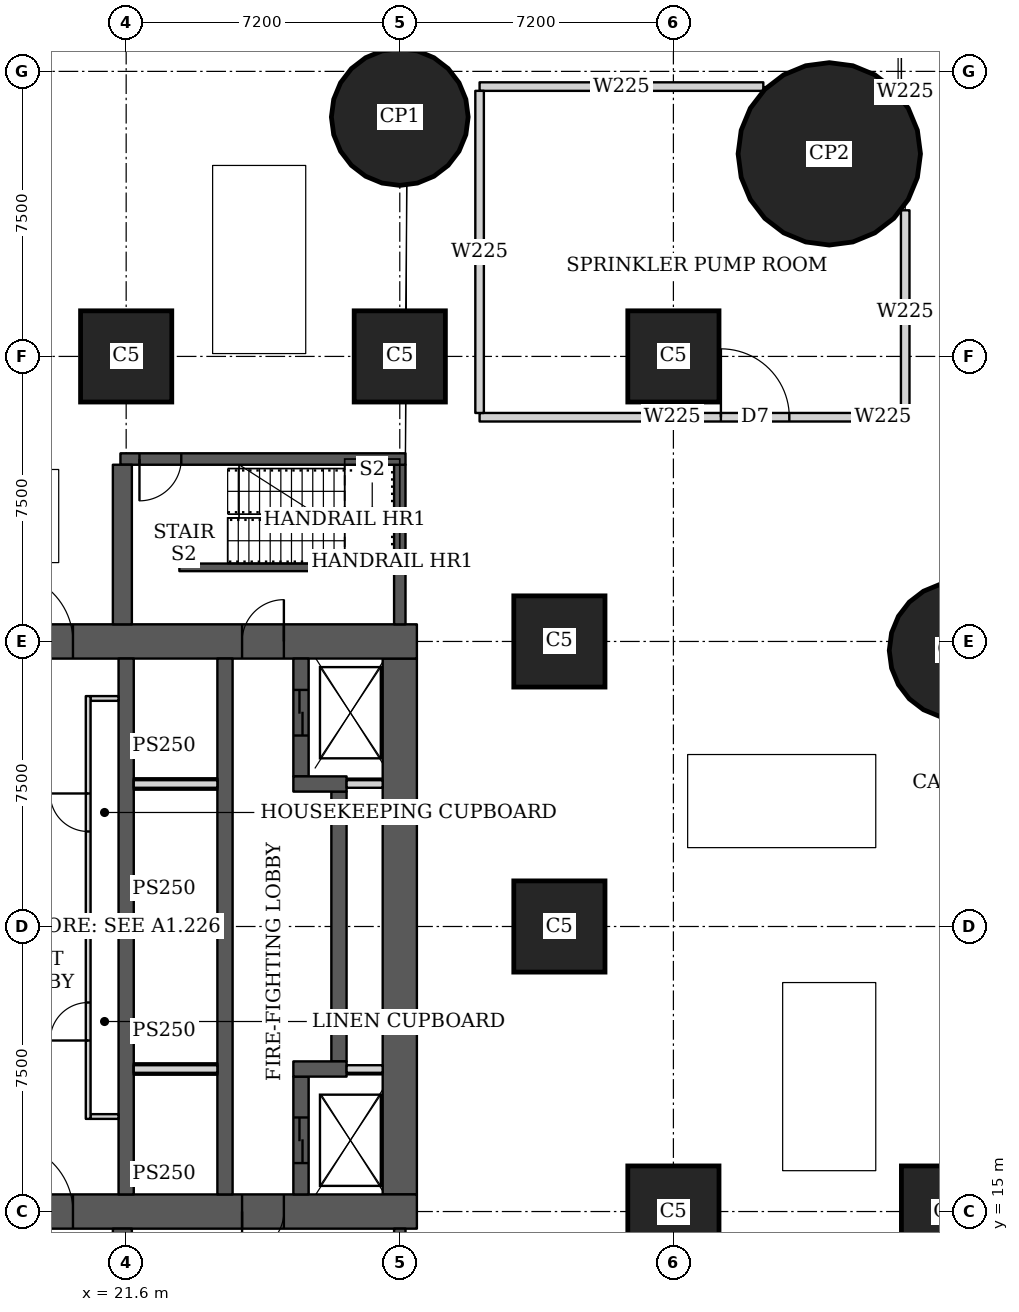
"""IFC4 building model, lengths in metres.
Left out: names, types, materials, properties, quantities, classifications, styles, units other than length and angle.
Written with IfcOpenShell. Run it as: python <this file> out.ifc"""

import sys

from ifc_helpers import new_model, si_unit, direction, frame, frame_2d, origin, origin_2d, place, context, subcontext, project, spatial, rectangle, circle, extrude, element, fill, save


model = new_model("IFC4")
c1 = context("Model", 3, precision=1e-05, world=origin(), true_north=direction((0.0, 1.0)))
c2 = subcontext(c1, "Body", "Model", "MODEL_VIEW")
j1 = project(units=[si_unit("LENGTHUNIT", "METRE"), si_unit("PLANEANGLEUNIT", "RADIAN")], contexts=[c1])
p1 = place(None, origin())
s1 = spatial("IfcSite", under=j1, at=p1, CompositionType="ELEMENT")
p2 = place(p1, origin())
s2 = spatial("IfcBuilding", under=s1, at=p2, CompositionType="ELEMENT")
p3 = place(p2, frame((0.0, 0.0, -4.0)))
s3 = spatial("IfcBuildingStorey", under=s2, at=p3, CompositionType="ELEMENT", Elevation=-4.0)
for number, where, z_axis, x_axis in (
    (1, (36.0, 15.0, 0.0), (0.0, 0.0, 1.0), (1.0, 0.0, 0.0)),
    (2, (43.2, 15.0, 0.0), (0.0, 0.0, 1.0), (1.0, 0.0, 0.0)),
    (3, (33.0, 22.5, 0.0), (0.0, 0.0, 1.0), (1.0, 0.0, 0.0)),
    (4, (33.0, 30.0, 0.0), (0.0, 0.0, 1.0), (1.0, 0.0, 0.0)),
):
    element("IfcColumn", number, at=place(p3, frame(where, z_axis=z_axis, x_axis=x_axis)), inside=s3, PredefinedType="COLUMN", context=c2, shape_type="SweptSolid", body=[
        extrude(rectangle(XDim=2.4, YDim=2.4, at=origin_2d()), origin(), (0.0, 0.0, 1.0), 4.0),
    ])
p4 = place(p3, frame((43.48, 29.763, 0.0), z_axis=(0.0, 0.0, 1.0), x_axis=(1.0, 0.0, 0.0)))
e5 = element("IfcColumn", 5, at=p4, inside=s3, PredefinedType="COLUMN", context=c2, shape_type="SweptSolid", body=[
    extrude(circle(Radius=1.8, at=origin_2d()), origin(), (0.0, 0.0, 1.0), 4.0),
])
for number, where, z_axis, x_axis in (
    (6, (21.6, 37.5, 0.0), (0.0, 0.0, 1.0), (1.0, 0.0, 0.0)),
    (7, (28.8, 37.5, 0.0), (0.0, 0.0, 1.0), (1.0, 0.0, 0.0)),
    (8, (36.0, 37.5, 0.0), (0.0, 0.0, 1.0), (1.0, 0.0, 0.0)),
):
    element("IfcColumn", number, at=place(p3, frame(where, z_axis=z_axis, x_axis=x_axis)), inside=s3, PredefinedType="COLUMN", context=c2, shape_type="SweptSolid", body=[
        extrude(rectangle(XDim=2.4, YDim=2.4, at=origin_2d()), origin(), (0.0, 0.0, 1.0), 4.0),
    ])
p5 = place(p3, frame((40.102, 42.83, 0.0), z_axis=(0.0, 0.0, 1.0), x_axis=(1.0, 0.0, 0.0)))
e9 = element("IfcColumn", 9, at=p5, inside=s3, PredefinedType="COLUMN", context=c2, shape_type="SweptSolid", body=[
    extrude(circle(Radius=2.4, at=origin_2d()), origin(), (0.0, 0.0, 1.0), 4.0),
])
p6 = place(p3, frame((28.8, 43.8, 0.0), z_axis=(0.0, 0.0, 1.0), x_axis=(1.0, 0.0, 0.0)))
e10 = element("IfcColumn", 10, at=p6, inside=s3, PredefinedType="COLUMN", context=c2, shape_type="SweptSolid", body=[
    extrude(circle(Radius=1.8, at=origin_2d()), origin(), (0.0, 0.0, 1.0), 4.0),
])
p7 = place(p3, frame((13.95, 15.0, 0.0), z_axis=(0.0, 0.0, 1.0), x_axis=(1.0, 0.0, 0.0)))
e11 = element("IfcWall", 11, at=p7, inside=s3, PredefinedType="SHEAR", context=c2, shape_type="SweptSolid", body=[
    extrude(rectangle(XDim=15.3, YDim=0.9, at=frame_2d((7.65, 0.0))), origin(), (0.0, 0.0, 1.0), 4.0),
])
p8 = place(p7, frame((4.45, 0.0, 0.0)))
e12 = element("IfcOpeningElement", 12, at=p8, cuts=e11, PredefinedType="OPENING", context=c2, shape_type="SweptSolid", body=[
    extrude(rectangle(XDim=1.8, YDim=2.1, at=frame_2d((0.9, 1.05))), frame((0.0, 0.46, 0.0), z_axis=(0.0, -1.0, 0.0), x_axis=(1.0, 0.0, 0.0)), (0.0, 0.0, 1.0), 0.92),
])
p9 = place(p7, frame((10.7, 0.0, 0.0)))
e13 = element("IfcOpeningElement", 13, at=p9, cuts=e11, PredefinedType="OPENING", context=c2, shape_type="SweptSolid", body=[
    extrude(rectangle(XDim=1.1, YDim=2.1, at=frame_2d((0.55, 1.05))), frame((0.0, 0.46, 0.0), z_axis=(0.0, -1.0, 0.0), x_axis=(1.0, 0.0, 0.0)), (0.0, 0.0, 1.0), 0.92),
])
p10 = place(p3, frame((13.95, 30.0, 0.0), z_axis=(0.0, 0.0, 1.0), x_axis=(1.0, 0.0, 0.0)))
e14 = element("IfcWall", 14, at=p10, inside=s3, PredefinedType="SHEAR", context=c2, shape_type="SweptSolid", body=[
    extrude(rectangle(XDim=15.3, YDim=0.9, at=frame_2d((7.65, 0.0))), origin(), (0.0, 0.0, 1.0), 4.0),
])
p11 = place(p10, frame((4.45, 0.0, 0.0)))
e15 = element("IfcOpeningElement", 15, at=p11, cuts=e14, PredefinedType="OPENING", context=c2, shape_type="SweptSolid", body=[
    extrude(rectangle(XDim=1.8, YDim=2.1, at=frame_2d((0.9, 1.05))), frame((0.0, 0.46, 0.0), z_axis=(0.0, -1.0, 0.0), x_axis=(1.0, 0.0, 0.0)), (0.0, 0.0, 1.0), 0.92),
])
p12 = place(p10, frame((10.7, 0.0, 0.0)))
e16 = element("IfcOpeningElement", 16, at=p12, cuts=e14, PredefinedType="OPENING", context=c2, shape_type="SweptSolid", body=[
    extrude(rectangle(XDim=1.1, YDim=2.1, at=frame_2d((0.55, 1.05))), frame((0.0, 0.46, 0.0), z_axis=(0.0, -1.0, 0.0), x_axis=(1.0, 0.0, 0.0)), (0.0, 0.0, 1.0), 0.92),
])
p13 = place(p3, frame((28.8, 15.45, 0.0), z_axis=(0.0, 0.0, 1.0), x_axis=(0.0, 1.0, 0.0)))
e17 = element("IfcWall", 17, at=p13, inside=s3, PredefinedType="SHEAR", context=c2, shape_type="SweptSolid", body=[
    extrude(rectangle(XDim=14.1, YDim=0.9, at=frame_2d((7.05, 0.0))), origin(), (0.0, 0.0, 1.0), 4.0),
])
for number, where, z_axis, x_axis in (
    (18, (21.6, 15.45, 0.0), (0.0, 0.0, 1.0), (0.0, 1.0, 0.0)),
    (19, (24.2, 15.45, 0.0), (0.0, 0.0, 1.0), (0.0, 1.0, 0.0)),
):
    element("IfcWall", number, at=place(p3, frame(where, z_axis=z_axis, x_axis=x_axis)), inside=s3, PredefinedType="SHEAR", context=c2, shape_type="SweptSolid", body=[
        extrude(rectangle(XDim=14.1, YDim=0.4, at=frame_2d((7.05, 0.0))), origin(), (0.0, 0.0, 1.0), 4.0),
    ])
p14 = place(p3, frame((26.2, 15.45, 0.0), z_axis=(0.0, 0.0, 1.0), x_axis=(0.0, 1.0, 0.0)))
e20 = element("IfcWall", 20, at=p14, inside=s3, PredefinedType="SHEAR", context=c2, shape_type="SweptSolid", body=[
    extrude(rectangle(XDim=3.1, YDim=0.4, at=frame_2d((1.55, 0.0))), origin(), (0.0, 0.0, 1.0), 4.0),
])
p15 = place(p14, frame((0.825, 0.0, 0.0)))
e21 = element("IfcOpeningElement", 21, at=p15, cuts=e20, PredefinedType="OPENING", context=c2, shape_type="SweptSolid", body=[
    extrude(rectangle(XDim=1.2, YDim=2.1, at=frame_2d((0.6, 1.05))), frame((0.0, 0.21, 0.0), z_axis=(0.0, -1.0, 0.0), x_axis=(1.0, 0.0, 0.0)), (0.0, 0.0, 1.0), 0.42),
])
p16 = place(p3, frame((26.0, 18.75, 0.0), z_axis=(0.0, 0.0, 1.0), x_axis=(1.0, 0.0, 0.0)))
e22 = element("IfcWall", 22, at=p16, inside=s3, PredefinedType="SHEAR", context=c2, shape_type="SweptSolid", body=[
    extrude(rectangle(XDim=1.4, YDim=0.4, at=frame_2d((0.7, 0.0))), origin(), (0.0, 0.0, 1.0), 4.0),
])
p17 = place(p3, frame((27.2, 18.95, 0.0), z_axis=(0.0, 0.0, 1.0), x_axis=(0.0, 1.0, 0.0)))
e23 = element("IfcWall", 23, at=p17, inside=s3, PredefinedType="SHEAR", context=c2, shape_type="SweptSolid", body=[
    extrude(rectangle(XDim=7.1, YDim=0.4, at=frame_2d((3.55, 0.0))), origin(), (0.0, 0.0, 1.0), 4.0),
])
p18 = place(p3, frame((26.0, 26.25, 0.0), z_axis=(0.0, 0.0, 1.0), x_axis=(1.0, 0.0, 0.0)))
e24 = element("IfcWall", 24, at=p18, inside=s3, PredefinedType="SHEAR", context=c2, shape_type="SweptSolid", body=[
    extrude(rectangle(XDim=1.4, YDim=0.4, at=frame_2d((0.7, 0.0))), origin(), (0.0, 0.0, 1.0), 4.0),
])
p19 = place(p3, frame((26.2, 26.45, 0.0), z_axis=(0.0, 0.0, 1.0), x_axis=(0.0, 1.0, 0.0)))
e25 = element("IfcWall", 25, at=p19, inside=s3, PredefinedType="SHEAR", context=c2, shape_type="SweptSolid", body=[
    extrude(rectangle(XDim=3.1, YDim=0.4, at=frame_2d((1.55, 0.0))), origin(), (0.0, 0.0, 1.0), 4.0),
])
p20 = place(p19, frame((1.075, 0.0, 0.0)))
e26 = element("IfcOpeningElement", 26, at=p20, cuts=e25, PredefinedType="OPENING", context=c2, shape_type="SweptSolid", body=[
    extrude(rectangle(XDim=1.2, YDim=2.1, at=frame_2d((0.6, 1.05))), frame((0.0, 0.21, 0.0), z_axis=(0.0, -1.0, 0.0), x_axis=(1.0, 0.0, 0.0)), (0.0, 0.0, 1.0), 0.42),
])
p21 = place(p3, frame((21.5, 10.35, 0.0), z_axis=(0.0, 0.0, 1.0), x_axis=(0.0, 1.0, 0.0)))
e27 = element("IfcWall", 27, at=p21, inside=s3, PredefinedType="SHEAR", context=c2, shape_type="SweptSolid", body=[
    extrude(rectangle(XDim=4.2, YDim=0.5, at=frame_2d((2.1, 0.0))), origin(), (0.0, 0.0, 1.0), 4.0),
])
p22 = place(p3, frame((28.8, 10.35, 0.0), z_axis=(0.0, 0.0, 1.0), x_axis=(0.0, 1.0, 0.0)))
e28 = element("IfcWall", 28, at=p22, inside=s3, PredefinedType="SHEAR", context=c2, shape_type="SweptSolid", body=[
    extrude(rectangle(XDim=4.2, YDim=0.3, at=frame_2d((2.1, 0.0))), origin(), (0.0, 0.0, 1.0), 4.0),
])
p23 = place(p3, frame((21.45, 34.8, 0.0), z_axis=(0.0, 0.0, 1.0), x_axis=(1.0, 0.0, 0.0)))
e29 = element("IfcWall", 29, at=p23, inside=s3, PredefinedType="SHEAR", context=c2, shape_type="SweptSolid", body=[
    extrude(rectangle(XDim=7.5, YDim=0.3, at=frame_2d((3.75, 0.0))), origin(), (0.0, 0.0, 1.0), 4.0),
])
p24 = place(p23, frame((0.5, 0.0, 0.0)))
e30 = element("IfcOpeningElement", 30, at=p24, cuts=e29, PredefinedType="OPENING", context=c2, shape_type="SweptSolid", body=[
    extrude(rectangle(XDim=1.1, YDim=2.1, at=frame_2d((0.55, 1.05))), frame((0.0, 0.16, 0.0), z_axis=(0.0, -1.0, 0.0), x_axis=(1.0, 0.0, 0.0)), (0.0, 0.0, 1.0), 0.32),
])
p25 = place(p3, frame((21.5, 30.45, 0.0), z_axis=(0.0, 0.0, 1.0), x_axis=(0.0, 1.0, 0.0)))
e31 = element("IfcWall", 31, at=p25, inside=s3, PredefinedType="SHEAR", context=c2, shape_type="SweptSolid", body=[
    extrude(rectangle(XDim=4.2, YDim=0.5, at=frame_2d((2.1, 0.0))), origin(), (0.0, 0.0, 1.0), 4.0),
])
p26 = place(p3, frame((28.8, 30.45, 0.0), z_axis=(0.0, 0.0, 1.0), x_axis=(0.0, 1.0, 0.0)))
e32 = element("IfcWall", 32, at=p26, inside=s3, PredefinedType="SHEAR", context=c2, shape_type="SweptSolid", body=[
    extrude(rectangle(XDim=4.2, YDim=0.3, at=frame_2d((2.1, 0.0))), origin(), (0.0, 0.0, 1.0), 4.0),
])
p27 = place(p3, frame((30.9, 35.9, 0.0), z_axis=(0.0, 0.0, 1.0), x_axis=(1.0, 0.0, 0.0)))
e33 = element("IfcWall", 33, at=p27, inside=s3, PredefinedType="SOLIDWALL", context=c2, shape_type="SweptSolid", body=[
    extrude(rectangle(XDim=10.138, YDim=0.225, at=frame_2d((5.069, 0.0))), origin(), (0.0, 0.0, 1.0), 3.7),
])
p28 = place(p27, frame((6.35, 0.0, 0.0)))
e34 = element("IfcOpeningElement", 34, at=p28, cuts=e33, PredefinedType="OPENING", context=c2, shape_type="SweptSolid", body=[
    extrude(rectangle(XDim=1.8, YDim=2.4, at=frame_2d((0.9, 1.2))), frame((0.0, 0.123, 0.0), z_axis=(0.0, -1.0, 0.0), x_axis=(1.0, 0.0, 0.0)), (0.0, 0.0, 1.0), 0.245),
])
p29 = place(p3, frame((41.038, 35.9, 0.0), z_axis=(0.0, 0.0, 1.0), x_axis=(1.0, 0.0, 0.0)))
e35 = element("IfcWall", 35, at=p29, inside=s3, PredefinedType="SOLIDWALL", context=c2, shape_type="SweptSolid", body=[
    extrude(rectangle(XDim=0.95, YDim=0.225, at=frame_2d((0.475, 0.0))), origin(), (0.0, 0.0, 1.0), 2.2),
])
p30 = place(p3, frame((30.9, 36.012, 0.0), z_axis=(0.0, 0.0, 1.0), x_axis=(0.0, 1.0, 0.0)))
e36 = element("IfcWall", 36, at=p30, inside=s3, PredefinedType="SOLIDWALL", context=c2, shape_type="SweptSolid", body=[
    extrude(rectangle(XDim=8.476, YDim=0.225, at=frame_2d((4.238, 0.0))), origin(), (0.0, 0.0, 1.0), 2.2),
])
p31 = place(p3, frame((42.1, 36.0, 0.0), z_axis=(0.0, 0.0, 1.0), x_axis=(0.0, 1.0, 0.0)))
e37 = element("IfcWall", 37, at=p31, inside=s3, PredefinedType="SOLIDWALL", context=c2, shape_type="SweptSolid", body=[
    extrude(rectangle(XDim=5.345, YDim=0.225, at=frame_2d((2.672, 0.0))), origin(), (0.0, 0.0, 1.0), 2.2),
])
p32 = place(p3, frame((42.1, 44.315, 0.0), z_axis=(0.0, 0.0, 1.0), x_axis=(0.0, 1.0, 0.0)))
e38 = element("IfcWall", 38, at=p32, inside=s3, PredefinedType="SOLIDWALL", context=c2, shape_type="SweptSolid", body=[
    extrude(rectangle(XDim=0.285, YDim=0.225, at=frame_2d((0.143, 0.0))), origin(), (0.0, 0.0, 1.0), 3.7),
])
p33 = place(p3, frame((30.9, 44.6, 0.0), z_axis=(0.0, 0.0, 1.0), x_axis=(1.0, 0.0, 0.0)))
e39 = element("IfcWall", 39, at=p33, inside=s3, PredefinedType="SOLIDWALL", context=c2, shape_type="SweptSolid", body=[
    extrude(rectangle(XDim=7.466, YDim=0.225, at=frame_2d((3.733, 0.0))), origin(), (0.0, 0.0, 1.0), 3.7),
])
p34 = place(p3, frame((41.838, 44.6, 0.0), z_axis=(0.0, 0.0, 1.0), x_axis=(1.0, 0.0, 0.0)))
e40 = element("IfcWall", 40, at=p34, inside=s3, PredefinedType="SOLIDWALL", context=c2, shape_type="SweptSolid", body=[
    extrude(rectangle(XDim=0.15, YDim=0.225, at=frame_2d((0.075, 0.0))), origin(), (0.0, 0.0, 1.0), 3.7),
])
p35 = place(p3, frame((20.6, 17.438, 0.0), z_axis=(0.0, 0.0, 1.0), x_axis=(0.0, 1.0, 0.0)))
e41 = element("IfcWall", 41, at=p35, inside=s3, PredefinedType="PARTITIONING", context=c2, shape_type="SweptSolid", body=[
    extrude(rectangle(XDim=11.124, YDim=0.125, at=frame_2d((5.562, 0.0))), origin(), (0.0, 0.0, 1.0), 3.7),
])
p36 = place(p35, frame((2.062, 0.0, 0.0)))
e42 = element("IfcOpeningElement", 42, at=p36, cuts=e41, PredefinedType="OPENING", context=c2, shape_type="SweptSolid", body=[
    extrude(rectangle(XDim=1.0, YDim=2.1, at=frame_2d((0.5, 1.05))), frame((0.0, 0.073, 0.0), z_axis=(0.0, -1.0, 0.0), x_axis=(1.0, 0.0, 0.0)), (0.0, 0.0, 1.0), 0.145),
])
p37 = place(p35, frame((7.562, 0.0, 0.0)))
e43 = element("IfcOpeningElement", 43, at=p37, cuts=e41, PredefinedType="OPENING", context=c2, shape_type="SweptSolid", body=[
    extrude(rectangle(XDim=1.0, YDim=2.1, at=frame_2d((0.5, 1.05))), frame((0.0, 0.073, 0.0), z_axis=(0.0, -1.0, 0.0), x_axis=(1.0, 0.0, 0.0)), (0.0, 0.0, 1.0), 0.145),
])
for number, where, z_axis, x_axis in (
    (44, (20.663, 17.5, 0.0), (0.0, 0.0, 1.0), (1.0, 0.0, 0.0)),
    (45, (20.663, 28.5, 0.0), (0.0, 0.0, 1.0), (1.0, 0.0, 0.0)),
    (46, (20.663, 22.5, 0.0), (0.0, 0.0, 1.0), (1.0, 0.0, 0.0)),
):
    element("IfcWall", number, at=place(p3, frame(where, z_axis=z_axis, x_axis=x_axis)), inside=s3, PredefinedType="PARTITIONING", context=c2, shape_type="SweptSolid", body=[
        extrude(rectangle(XDim=0.737, YDim=0.125, at=frame_2d((0.368, 0.0))), origin(), (0.0, 0.0, 1.0), 3.7),
    ])
p38 = place(p3, frame((23.0, 31.95, 0.0), z_axis=(0.0, 0.0, 1.0), x_axis=(1.0, 0.0, 0.0)))
e47 = element("IfcWall", 47, at=p38, inside=s3, PredefinedType="SHEAR", context=c2, shape_type="SweptSolid", body=[
    extrude(rectangle(XDim=5.8, YDim=0.2, at=frame_2d((2.9, 0.0))), origin(), (0.0, 0.0, 1.0), 4.0),
])
p39 = place(p3, frame((21.8, 18.75, 0.0), z_axis=(0.0, 0.0, 1.0), x_axis=(1.0, 0.0, 0.0)))
e48 = element("IfcWall", 48, at=p39, inside=s3, PredefinedType="SHEAR", context=c2, shape_type="SweptSolid", body=[
    extrude(rectangle(XDim=2.2, YDim=0.3, at=frame_2d((1.1, 0.0))), origin(), (0.0, 0.0, 1.0), 2.4),
])
p40 = place(p3, frame((21.8, 18.75, 2.4), z_axis=(0.0, 0.0, 1.0), x_axis=(1.0, 0.0, 0.0)))
e49 = element("IfcWall", 49, at=p40, inside=s3, PredefinedType="SOLIDWALL", context=c2, shape_type="SweptSolid", body=[
    extrude(rectangle(XDim=2.2, YDim=0.2, at=frame_2d((1.1, 0.0))), origin(), (0.0, 0.0, 1.0), 1.3),
])
p41 = place(p3, frame((21.8, 22.5, 0.0), z_axis=(0.0, 0.0, 1.0), x_axis=(1.0, 0.0, 0.0)))
e50 = element("IfcWall", 50, at=p41, inside=s3, PredefinedType="SHEAR", context=c2, shape_type="SweptSolid", body=[
    extrude(rectangle(XDim=2.2, YDim=0.3, at=frame_2d((1.1, 0.0))), origin(), (0.0, 0.0, 1.0), 2.4),
])
p42 = place(p3, frame((21.8, 22.5, 2.4), z_axis=(0.0, 0.0, 1.0), x_axis=(1.0, 0.0, 0.0)))
e51 = element("IfcWall", 51, at=p42, inside=s3, PredefinedType="SOLIDWALL", context=c2, shape_type="SweptSolid", body=[
    extrude(rectangle(XDim=2.2, YDim=0.2, at=frame_2d((1.1, 0.0))), origin(), (0.0, 0.0, 1.0), 1.3),
])
p43 = place(p3, frame((21.8, 26.25, 0.0), z_axis=(0.0, 0.0, 1.0), x_axis=(1.0, 0.0, 0.0)))
e52 = element("IfcWall", 52, at=p43, inside=s3, PredefinedType="SHEAR", context=c2, shape_type="SweptSolid", body=[
    extrude(rectangle(XDim=2.2, YDim=0.3, at=frame_2d((1.1, 0.0))), origin(), (0.0, 0.0, 1.0), 2.4),
])
p44 = place(p3, frame((21.8, 26.25, 2.4), z_axis=(0.0, 0.0, 1.0), x_axis=(1.0, 0.0, 0.0)))
e53 = element("IfcWall", 53, at=p44, inside=s3, PredefinedType="SOLIDWALL", context=c2, shape_type="SweptSolid", body=[
    extrude(rectangle(XDim=2.2, YDim=0.2, at=frame_2d((1.1, 0.0))), origin(), (0.0, 0.0, 1.0), 1.3),
])
for number, where, z_axis, x_axis in (
    (54, (27.4, 18.75, 0.0), (0.0, 0.0, 1.0), (1.0, 0.0, 0.0)),
    (55, (27.4, 26.25, 0.0), (0.0, 0.0, 1.0), (1.0, 0.0, 0.0)),
):
    element("IfcWall", number, at=place(p3, frame(where, z_axis=z_axis, x_axis=x_axis)), inside=s3, PredefinedType="SOLIDWALL", context=c2, shape_type="SweptSolid", body=[
        extrude(rectangle(XDim=0.95, YDim=0.2, at=frame_2d((0.475, 0.0))), origin(), (0.0, 0.0, 1.0), 3.7),
    ])
p45 = place(p28, origin())
e56 = element("IfcDoor", 56, at=p45, inside=s3, OperationType="DOUBLE_DOOR_SINGLE_SWING", PredefinedType="DOOR", context=c2, shape_type="SweptSolid", body=[
    extrude(rectangle(XDim=1.8, YDim=2.4, at=frame_2d((0.9, 1.2))), frame((0.0, 0.025, 0.0), z_axis=(0.0, -1.0, 0.0), x_axis=(1.0, 0.0, 0.0)), (0.0, 0.0, 1.0), 0.05),
])
fill(e34, e56)
p46 = place(p36, origin())
e57 = element("IfcDoor", 57, at=p46, inside=s3, OperationType="SINGLE_SWING_LEFT", PredefinedType="DOOR", context=c2, shape_type="SweptSolid", body=[
    extrude(rectangle(XDim=1.0, YDim=2.1, at=frame_2d((0.5, 1.05))), frame((0.0, 0.025, 0.0), z_axis=(0.0, -1.0, 0.0), x_axis=(1.0, 0.0, 0.0)), (0.0, 0.0, 1.0), 0.05),
])
fill(e42, e57)
p47 = place(p37, origin())
e58 = element("IfcDoor", 58, at=p47, inside=s3, OperationType="SINGLE_SWING_RIGHT", PredefinedType="DOOR", context=c2, shape_type="SweptSolid", body=[
    extrude(rectangle(XDim=1.0, YDim=2.1, at=frame_2d((0.5, 1.05))), frame((0.0, 0.025, 0.0), z_axis=(0.0, -1.0, 0.0), x_axis=(1.0, 0.0, 0.0)), (0.0, 0.0, 1.0), 0.05),
])
fill(e43, e58)
p48 = place(p8, origin())
e59 = element("IfcDoor", 59, at=p48, inside=s3, OperationType="DOUBLE_DOOR_SINGLE_SWING", PredefinedType="DOOR", context=c2, shape_type="SweptSolid", body=[
    extrude(rectangle(XDim=1.8, YDim=2.1, at=frame_2d((0.9, 1.05))), frame((0.0, 0.025, 0.0), z_axis=(0.0, -1.0, 0.0), x_axis=(1.0, 0.0, 0.0)), (0.0, 0.0, 1.0), 0.05),
])
fill(e12, e59)
p49 = place(p9, origin())
e60 = element("IfcDoor", 60, at=p49, inside=s3, OperationType="SINGLE_SWING_RIGHT", PredefinedType="DOOR", context=c2, shape_type="SweptSolid", body=[
    extrude(rectangle(XDim=1.1, YDim=2.1, at=frame_2d((0.55, 1.05))), frame((0.0, 0.025, 0.0), z_axis=(0.0, -1.0, 0.0), x_axis=(1.0, 0.0, 0.0)), (0.0, 0.0, 1.0), 0.05),
])
fill(e13, e60)
p50 = place(p11, origin())
e61 = element("IfcDoor", 61, at=p50, inside=s3, OperationType="DOUBLE_DOOR_SINGLE_SWING", PredefinedType="DOOR", context=c2, shape_type="SweptSolid", body=[
    extrude(rectangle(XDim=1.8, YDim=2.1, at=frame_2d((0.9, 1.05))), frame((0.0, 0.025, 0.0), z_axis=(0.0, -1.0, 0.0), x_axis=(1.0, 0.0, 0.0)), (0.0, 0.0, 1.0), 0.05),
])
fill(e15, e61)
p51 = place(p12, origin())
e62 = element("IfcDoor", 62, at=p51, inside=s3, OperationType="SINGLE_SWING_RIGHT", PredefinedType="DOOR", context=c2, shape_type="SweptSolid", body=[
    extrude(rectangle(XDim=1.1, YDim=2.1, at=frame_2d((0.55, 1.05))), frame((0.0, 0.025, 0.0), z_axis=(0.0, -1.0, 0.0), x_axis=(1.0, 0.0, 0.0)), (0.0, 0.0, 1.0), 0.05),
])
fill(e16, e62)
p52 = place(p15, origin())
e63 = element("IfcDoor", 63, at=p52, inside=s3, OperationType="DOUBLE_DOOR_SLIDING", PredefinedType="DOOR", context=c2, shape_type="SweptSolid", body=[
    extrude(rectangle(XDim=1.2, YDim=2.1, at=frame_2d((0.6, 1.05))), frame((0.0, 0.025, 0.0), z_axis=(0.0, -1.0, 0.0), x_axis=(1.0, 0.0, 0.0)), (0.0, 0.0, 1.0), 0.05),
])
fill(e21, e63)
p53 = place(p20, origin())
e64 = element("IfcDoor", 64, at=p53, inside=s3, OperationType="DOUBLE_DOOR_SLIDING", PredefinedType="DOOR", context=c2, shape_type="SweptSolid", body=[
    extrude(rectangle(XDim=1.2, YDim=2.1, at=frame_2d((0.6, 1.05))), frame((0.0, 0.025, 0.0), z_axis=(0.0, -1.0, 0.0), x_axis=(1.0, 0.0, 0.0)), (0.0, 0.0, 1.0), 0.05),
])
fill(e26, e64)
p54 = place(p24, origin())
e65 = element("IfcDoor", 65, at=p54, inside=s3, OperationType="SINGLE_SWING_RIGHT", PredefinedType="DOOR", context=c2, shape_type="SweptSolid", body=[
    extrude(rectangle(XDim=1.1, YDim=2.1, at=frame_2d((0.55, 1.05))), frame((0.0, 0.025, 0.0), z_axis=(0.0, -1.0, 0.0), x_axis=(1.0, 0.0, 0.0)), (0.0, 0.0, 1.0), 0.05),
])
fill(e30, e65)
save(model, sys.argv[1])
